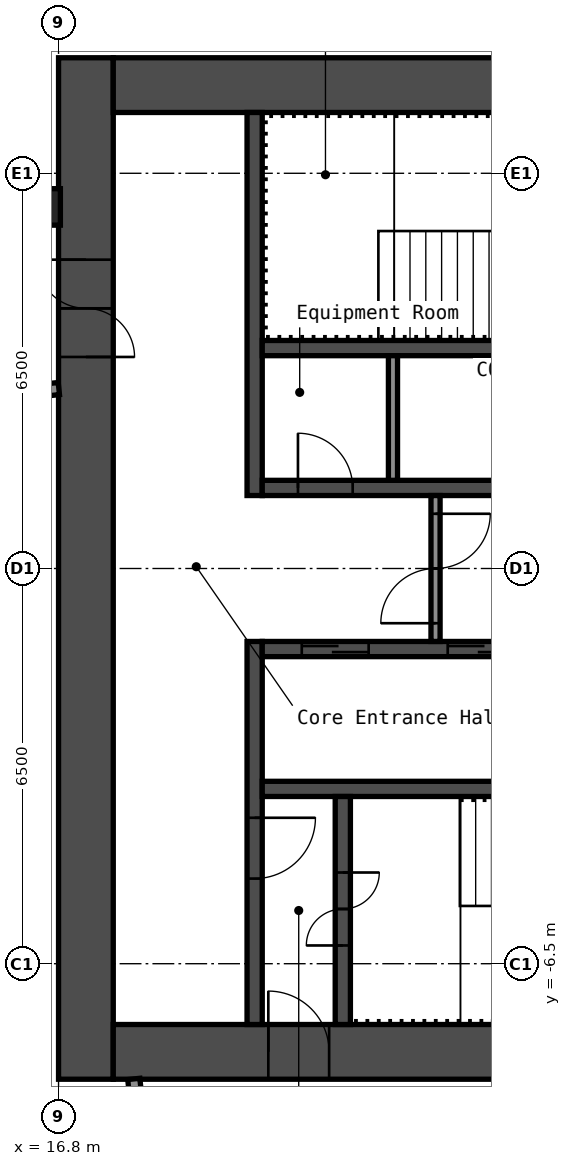
"""IFC4 building model, lengths in metres.
Left out: names, types, materials, properties, quantities, classifications, styles, units other than length and angle.
Written with IfcOpenShell. Run it as: python <this file> out.ifc"""

import sys

from ifc_helpers import new_model, si_unit, direction, frame, frame_2d, origin, origin_2d, place, context, subcontext, project, spatial, rectangle, hollow_rectangle, extrude, element, fill, save


model = new_model("IFC4")
c1 = context("Model", 3, precision=1e-05, world=origin(), true_north=direction((0.0, 1.0)))
c2 = subcontext(c1, "Body", "Model", "MODEL_VIEW")
j1 = project(units=[si_unit("LENGTHUNIT", "METRE"), si_unit("PLANEANGLEUNIT", "RADIAN")], contexts=[c1])
p1 = place(None, origin())
s1 = spatial("IfcSite", under=j1, at=p1, CompositionType="ELEMENT")
p2 = place(p1, origin())
s2 = spatial("IfcBuilding", under=s1, at=p2, CompositionType="ELEMENT")
p3 = place(p2, frame((0.0, 0.0, 248.6)))
s3 = spatial("IfcBuildingStorey", under=s2, at=p3, CompositionType="ELEMENT", Elevation=248.6)
p4 = place(p3, frame((16.53, 5.947, 0.0), z_axis=(0.0, 0.0, 1.0), x_axis=(1.0, 0.0, 0.0)))
e1 = element("IfcColumn", 1, at=p4, inside=s3, PredefinedType="COLUMN", context=c2, shape_type="SweptSolid", body=[
    extrude(hollow_rectangle(XDim=0.6, YDim=0.6, WallThickness=0.025, InnerFilletRadius=0.038, OuterFilletRadius=0.062, at=origin_2d()), origin(), (0.0, 0.0, 1.0), 2.75),
])
p5 = place(p3, frame((17.25, -8.4, 0.0), z_axis=(0.0, 0.0, 1.0), x_axis=(0.0, 1.0, 0.0)))
e2 = element("IfcWall", 2, at=p5, inside=s3, PredefinedType="SHEAR", context=c2, shape_type="SweptSolid", body=[
    extrude(rectangle(XDim=16.8, YDim=0.9, at=frame_2d((8.4, 0.0))), origin(), (0.0, 0.0, 1.0), 2.75),
])
p6 = place(p5, frame((11.879, 0.0, 0.0)))
e3 = element("IfcOpeningElement", 3, at=p6, cuts=e2, PredefinedType="OPENING", context=c2, shape_type="SweptSolid", body=[
    extrude(rectangle(XDim=1.6, YDim=2.1, at=frame_2d((0.8, 1.05))), frame((0.0, 0.46, 0.0), z_axis=(0.0, -1.0, 0.0), x_axis=(1.0, 0.0, 0.0)), (0.0, 0.0, 1.0), 0.92),
])
p7 = place(p3, frame((17.7, 7.95, 0.0), z_axis=(0.0, 0.0, 1.0), x_axis=(1.0, 0.0, 0.0)))
e4 = element("IfcWall", 4, at=p7, inside=s3, PredefinedType="SHEAR", context=c2, shape_type="SweptSolid", body=[
    extrude(rectangle(XDim=15.0, YDim=0.9, at=frame_2d((7.5, 0.0))), origin(), (0.0, 0.0, 1.0), 2.75),
])
p8 = place(p7, frame((10.4, 0.0, 0.0)))
e5 = element("IfcOpeningElement", 5, at=p8, cuts=e4, PredefinedType="OPENING", context=c2, shape_type="SweptSolid", body=[
    extrude(rectangle(XDim=1.2, YDim=2.1, at=frame_2d((0.6, 1.05))), frame((0.0, 0.46, 0.0), z_axis=(0.0, -1.0, 0.0), x_axis=(1.0, 0.0, 0.0)), (0.0, 0.0, 1.0), 0.92),
])
p9 = place(p7, frame((13.35, 0.0, 0.0)))
e6 = element("IfcOpeningElement", 6, at=p9, cuts=e4, PredefinedType="OPENING", context=c2, shape_type="SweptSolid", body=[
    extrude(rectangle(XDim=0.9, YDim=2.1, at=frame_2d((0.45, 1.05))), frame((0.0, 0.46, 0.0), z_axis=(0.0, -1.0, 0.0), x_axis=(1.0, 0.0, 0.0)), (0.0, 0.0, 1.0), 0.92),
])
p10 = place(p3, frame((17.7, -7.95, 0.0), z_axis=(0.0, 0.0, 1.0), x_axis=(1.0, 0.0, 0.0)))
e7 = element("IfcWall", 7, at=p10, inside=s3, PredefinedType="SHEAR", context=c2, shape_type="SweptSolid", body=[
    extrude(rectangle(XDim=15.0, YDim=0.9, at=frame_2d((7.5, 0.0))), origin(), (0.0, 0.0, 1.0), 2.75),
])
p11 = place(p10, frame((2.55, 0.0, 0.0)))
e8 = element("IfcOpeningElement", 8, at=p11, cuts=e7, PredefinedType="OPENING", context=c2, shape_type="SweptSolid", body=[
    extrude(rectangle(XDim=1.0, YDim=2.1, at=frame_2d((0.5, 1.05))), frame((0.0, 0.46, 0.0), z_axis=(0.0, -1.0, 0.0), x_axis=(1.0, 0.0, 0.0)), (0.0, 0.0, 1.0), 0.92),
])
p12 = place(p3, frame((20.025, 1.2, 0.0), z_axis=(0.0, 0.0, 1.0), x_axis=(0.0, 1.0, 0.0)))
e9 = element("IfcWall", 9, at=p12, inside=s3, PredefinedType="SHEAR", context=c2, shape_type="SweptSolid", body=[
    extrude(rectangle(XDim=6.3, YDim=0.25, at=frame_2d((3.15, 0.0))), origin(), (0.0, 0.0, 1.0), 2.75),
])
p13 = place(p3, frame((20.025, -7.5, 0.0), z_axis=(0.0, 0.0, 1.0), x_axis=(0.0, 1.0, 0.0)))
e10 = element("IfcWall", 10, at=p13, inside=s3, PredefinedType="SHEAR", context=c2, shape_type="SweptSolid", body=[
    extrude(rectangle(XDim=6.3, YDim=0.25, at=frame_2d((3.15, 0.0))), origin(), (0.0, 0.0, 1.0), 2.75),
])
p14 = place(p13, frame((2.4, 0.0, 0.0)))
e11 = element("IfcOpeningElement", 11, at=p14, cuts=e10, PredefinedType="OPENING", context=c2, shape_type="SweptSolid", body=[
    extrude(rectangle(XDim=1.0, YDim=2.1, at=frame_2d((0.5, 1.05))), frame((0.0, 0.135, 0.0), z_axis=(0.0, -1.0, 0.0), x_axis=(1.0, 0.0, 0.0)), (0.0, 0.0, 1.0), 0.27),
])
p15 = place(p3, frame((20.15, 1.325, 0.0), z_axis=(0.0, 0.0, 1.0), x_axis=(1.0, 0.0, 0.0)))
e12 = element("IfcWall", 12, at=p15, inside=s3, PredefinedType="SHEAR", context=c2, shape_type="SweptSolid", body=[
    extrude(rectangle(XDim=7.5, YDim=0.25, at=frame_2d((3.75, 0.0))), origin(), (0.0, 0.0, 1.0), 2.75),
])
p16 = place(p15, frame((0.587, 0.0, 0.0)))
e13 = element("IfcOpeningElement", 13, at=p16, cuts=e12, PredefinedType="OPENING", context=c2, shape_type="SweptSolid", body=[
    extrude(rectangle(XDim=0.9, YDim=2.1, at=frame_2d((0.45, 1.05))), frame((0.0, 0.135, 0.0), z_axis=(0.0, -1.0, 0.0), x_axis=(1.0, 0.0, 0.0)), (0.0, 0.0, 1.0), 0.27),
])
p17 = place(p15, frame((4.288, 0.0, 0.0)))
e14 = element("IfcOpeningElement", 14, at=p17, cuts=e12, PredefinedType="OPENING", context=c2, shape_type="SweptSolid", body=[
    extrude(rectangle(XDim=0.9, YDim=2.1, at=frame_2d((0.45, 1.05))), frame((0.0, 0.135, 0.0), z_axis=(0.0, -1.0, 0.0), x_axis=(1.0, 0.0, 0.0)), (0.0, 0.0, 1.0), 0.27),
])
p18 = place(p3, frame((20.15, 3.625, 0.0), z_axis=(0.0, 0.0, 1.0), x_axis=(1.0, 0.0, 0.0)))
e15 = element("IfcWall", 15, at=p18, inside=s3, PredefinedType="SHEAR", context=c2, shape_type="SweptSolid", body=[
    extrude(rectangle(XDim=7.5, YDim=0.25, at=frame_2d((3.75, 0.0))), origin(), (0.0, 0.0, 1.0), 2.75),
])
p19 = place(p3, frame((20.15, -1.325, 0.0), z_axis=(0.0, 0.0, 1.0), x_axis=(1.0, 0.0, 0.0)))
e16 = element("IfcWall", 16, at=p19, inside=s3, PredefinedType="SHEAR", context=c2, shape_type="SweptSolid", body=[
    extrude(rectangle(XDim=7.5, YDim=0.25, at=frame_2d((3.75, 0.0))), origin(), (0.0, 0.0, 1.0), 2.75),
])
p20 = place(p19, frame((0.65, 0.0, 0.0)))
e17 = element("IfcOpeningElement", 17, at=p20, cuts=e16, PredefinedType="OPENING", context=c2, shape_type="SweptSolid", body=[
    extrude(rectangle(XDim=1.1, YDim=2.1, at=frame_2d((0.55, 1.05))), frame((0.0, 0.135, 0.0), z_axis=(0.0, -1.0, 0.0), x_axis=(1.0, 0.0, 0.0)), (0.0, 0.0, 1.0), 0.27),
])
p21 = place(p19, frame((3.05, 0.0, 0.0)))
e18 = element("IfcOpeningElement", 18, at=p21, cuts=e16, PredefinedType="OPENING", context=c2, shape_type="SweptSolid", body=[
    extrude(rectangle(XDim=1.1, YDim=2.1, at=frame_2d((0.55, 1.05))), frame((0.0, 0.135, 0.0), z_axis=(0.0, -1.0, 0.0), x_axis=(1.0, 0.0, 0.0)), (0.0, 0.0, 1.0), 0.27),
])
p22 = place(p19, frame((5.45, 0.0, 0.0)))
e19 = element("IfcOpeningElement", 19, at=p22, cuts=e16, PredefinedType="OPENING", context=c2, shape_type="SweptSolid", body=[
    extrude(rectangle(XDim=1.1, YDim=2.1, at=frame_2d((0.55, 1.05))), frame((0.0, 0.135, 0.0), z_axis=(0.0, -1.0, 0.0), x_axis=(1.0, 0.0, 0.0)), (0.0, 0.0, 1.0), 0.27),
])
p23 = place(p3, frame((20.15, -3.625, 0.0), z_axis=(0.0, 0.0, 1.0), x_axis=(1.0, 0.0, 0.0)))
e20 = element("IfcWall", 20, at=p23, inside=s3, PredefinedType="SHEAR", context=c2, shape_type="SweptSolid", body=[
    extrude(rectangle(XDim=7.5, YDim=0.25, at=frame_2d((3.75, 0.0))), origin(), (0.0, 0.0, 1.0), 2.75),
])
p24 = place(p3, frame((21.475, -7.5, 0.0), z_axis=(0.0, 0.0, 1.0), x_axis=(0.0, 1.0, 0.0)))
e21 = element("IfcWall", 21, at=p24, inside=s3, PredefinedType="SHEAR", context=c2, shape_type="SweptSolid", body=[
    extrude(rectangle(XDim=3.75, YDim=0.25, at=frame_2d((1.875, 0.0))), origin(), (0.0, 0.0, 1.0), 2.75),
])
p25 = place(p24, frame((1.3, 0.0, 0.0)))
e22 = element("IfcOpeningElement", 22, at=p25, cuts=e21, PredefinedType="OPENING", context=c2, shape_type="SweptSolid", body=[
    extrude(rectangle(XDim=1.2, YDim=2.1, at=frame_2d((0.6, 1.05))), frame((0.0, 0.135, 0.0), z_axis=(0.0, -1.0, 0.0), x_axis=(1.0, 0.0, 0.0)), (0.0, 0.0, 1.0), 0.27),
])
p26 = place(p3, frame((23.0, -1.2, 0.0), z_axis=(0.0, 0.0, 1.0), x_axis=(0.0, 1.0, 0.0)))
e23 = element("IfcWall", 23, at=p26, inside=s3, PredefinedType="PARTITIONING", context=c2, shape_type="SweptSolid", body=[
    extrude(rectangle(XDim=2.4, YDim=0.15, at=frame_2d((1.2, 0.0))), origin(), (0.0, 0.0, 1.0), 2.75),
])
p27 = place(p26, frame((0.3, 0.0, 0.0)))
e24 = element("IfcOpeningElement", 24, at=p27, cuts=e23, PredefinedType="OPENING", context=c2, shape_type="SweptSolid", body=[
    extrude(rectangle(XDim=1.8, YDim=2.1, at=frame_2d((0.9, 1.05))), frame((0.0, 0.085, 0.0), z_axis=(0.0, -1.0, 0.0), x_axis=(1.0, 0.0, 0.0)), (0.0, 0.0, 1.0), 0.17),
])
p28 = place(p3, frame((22.3, 1.45, 0.0), z_axis=(0.0, 0.0, 1.0), x_axis=(0.0, 1.0, 0.0)))
e25 = element("IfcWall", 25, at=p28, inside=s3, PredefinedType="PARTITIONING", context=c2, shape_type="SweptSolid", body=[
    extrude(rectangle(XDim=2.05, YDim=0.15, at=frame_2d((1.025, 0.0))), origin(), (0.0, 0.0, 1.0), 2.75),
])
p29 = place(p3, frame((-16.572, -0.549, 0.0), z_axis=(0.0, 0.0, 1.0), x_axis=(0.994521146831, 0.104535584879, 0.0)))
e26 = element("IfcWall", 26, at=p29, inside=s3, PredefinedType="PARTITIONING", context=c2, shape_type="SweptSolid", body=[
    extrude(rectangle(XDim=33.561, YDim=0.2, at=frame_2d((16.78, 0.0))), origin(), (0.0, 0.0, 1.0), 2.75),
])
p30 = place(p29, frame((4.2, 0.0, 0.0)))
e27 = element("IfcOpeningElement", 27, at=p30, cuts=e26, PredefinedType="OPENING", context=c2, shape_type="SweptSolid", body=[
    extrude(rectangle(XDim=1.6, YDim=2.1, at=frame_2d((0.8, 1.05))), frame((0.0, 0.11, 0.0), z_axis=(0.0, -1.0, 0.0), x_axis=(1.0, 0.0, 0.0)), (0.0, 0.0, 1.0), 0.22),
])
p31 = place(p29, frame((10.64, 0.0, 0.0)))
e28 = element("IfcOpeningElement", 28, at=p31, cuts=e26, PredefinedType="OPENING", context=c2, shape_type="SweptSolid", body=[
    extrude(rectangle(XDim=0.9, YDim=2.1, at=frame_2d((0.45, 1.05))), frame((0.0, 0.11, 0.0), z_axis=(0.0, -1.0, 0.0), x_axis=(1.0, 0.0, 0.0)), (0.0, 0.0, 1.0), 0.22),
])
p32 = place(p29, frame((14.84, 0.0, 0.0)))
e29 = element("IfcOpeningElement", 29, at=p32, cuts=e26, PredefinedType="OPENING", context=c2, shape_type="SweptSolid", body=[
    extrude(rectangle(XDim=0.9, YDim=2.1, at=frame_2d((0.45, 1.05))), frame((0.0, 0.11, 0.0), z_axis=(0.0, -1.0, 0.0), x_axis=(1.0, 0.0, 0.0)), (0.0, 0.0, 1.0), 0.22),
])
p33 = place(p29, frame((19.65, 0.0, 0.0)))
e30 = element("IfcOpeningElement", 30, at=p33, cuts=e26, PredefinedType="OPENING", context=c2, shape_type="SweptSolid", body=[
    extrude(rectangle(XDim=1.0, YDim=2.1, at=frame_2d((0.5, 1.05))), frame((0.0, 0.11, 0.0), z_axis=(0.0, -1.0, 0.0), x_axis=(1.0, 0.0, 0.0)), (0.0, 0.0, 1.0), 0.22),
])
p34 = place(p29, frame((21.35, 0.0, 0.0)))
e31 = element("IfcOpeningElement", 31, at=p34, cuts=e26, PredefinedType="OPENING", context=c2, shape_type="SweptSolid", body=[
    extrude(rectangle(XDim=1.0, YDim=2.1, at=frame_2d((0.5, 1.05))), frame((0.0, 0.11, 0.0), z_axis=(0.0, -1.0, 0.0), x_axis=(1.0, 0.0, 0.0)), (0.0, 0.0, 1.0), 0.22),
])
p35 = place(p29, frame((29.4, 0.0, 0.0)))
e32 = element("IfcOpeningElement", 32, at=p35, cuts=e26, PredefinedType="OPENING", context=c2, shape_type="SweptSolid", body=[
    extrude(rectangle(XDim=1.6, YDim=2.1, at=frame_2d((0.8, 1.05))), frame((0.0, 0.11, 0.0), z_axis=(0.0, -1.0, 0.0), x_axis=(1.0, 0.0, 0.0)), (0.0, 0.0, 1.0), 0.22),
])
p36 = place(p3, frame((18.516, -12.949, 0.0), z_axis=(0.0, 0.0, 1.0), x_axis=(-0.104548796268, 0.994519758074, 0.0)))
e33 = element("IfcWall", 33, at=p36, inside=s3, PredefinedType="PARTITIONING", context=c2, shape_type="SweptSolid", body=[
    extrude(rectangle(XDim=4.579, YDim=0.2, at=frame_2d((2.29, 0.0))), origin(), (0.0, 0.0, 1.0), 2.75),
])
p37 = place(p6, origin())
e34 = element("IfcDoor", 34, at=p37, inside=s3, OperationType="DOUBLE_DOOR_SINGLE_SWING", PredefinedType="DOOR", context=c2, shape_type="SweptSolid", body=[
    extrude(rectangle(XDim=1.6, YDim=2.1, at=frame_2d((0.8, 1.05))), frame((0.0, 0.025, 0.0), z_axis=(0.0, -1.0, 0.0), x_axis=(1.0, 0.0, 0.0)), (0.0, 0.0, 1.0), 0.05),
])
fill(e3, e34)
p38 = place(p11, origin())
e35 = element("IfcDoor", 35, at=p38, inside=s3, OperationType="SINGLE_SWING_RIGHT", PredefinedType="DOOR", context=c2, shape_type="SweptSolid", body=[
    extrude(rectangle(XDim=1.0, YDim=2.1, at=frame_2d((0.5, 1.05))), frame((0.0, 0.025, 0.0), z_axis=(0.0, -1.0, 0.0), x_axis=(1.0, 0.0, 0.0)), (0.0, 0.0, 1.0), 0.05),
])
fill(e8, e35)
p39 = place(p25, origin())
e36 = element("IfcDoor", 36, at=p39, inside=s3, OperationType="DOUBLE_DOOR_SINGLE_SWING", PredefinedType="DOOR", context=c2, shape_type="SweptSolid", body=[
    extrude(rectangle(XDim=1.2, YDim=2.1, at=frame_2d((0.6, 1.05))), frame((0.0, 0.025, 0.0), z_axis=(0.0, -1.0, 0.0), x_axis=(1.0, 0.0, 0.0)), (0.0, 0.0, 1.0), 0.05),
])
fill(e22, e36)
p40 = place(p14, origin())
e37 = element("IfcDoor", 37, at=p40, inside=s3, OperationType="SINGLE_SWING_RIGHT", PredefinedType="DOOR", context=c2, shape_type="SweptSolid", body=[
    extrude(rectangle(XDim=1.0, YDim=2.1, at=frame_2d((0.5, 1.05))), frame((0.0, 0.025, 0.0), z_axis=(0.0, -1.0, 0.0), x_axis=(1.0, 0.0, 0.0)), (0.0, 0.0, 1.0), 0.05),
])
fill(e11, e37)
p41 = place(p27, origin())
e38 = element("IfcDoor", 38, at=p41, inside=s3, OperationType="DOUBLE_DOOR_SINGLE_SWING", PredefinedType="DOOR", context=c2, shape_type="SweptSolid", body=[
    extrude(rectangle(XDim=1.8, YDim=2.1, at=frame_2d((0.9, 1.05))), frame((0.0, 0.025, 0.0), z_axis=(0.0, -1.0, 0.0), x_axis=(1.0, 0.0, 0.0)), (0.0, 0.0, 1.0), 0.05),
])
fill(e24, e38)
p42 = place(p16, origin())
e39 = element("IfcDoor", 39, at=p42, inside=s3, OperationType="SINGLE_SWING_RIGHT", PredefinedType="DOOR", context=c2, shape_type="SweptSolid", body=[
    extrude(rectangle(XDim=0.9, YDim=2.1, at=frame_2d((0.45, 1.05))), frame((0.0, 0.025, 0.0), z_axis=(0.0, -1.0, 0.0), x_axis=(1.0, 0.0, 0.0)), (0.0, 0.0, 1.0), 0.05),
])
fill(e13, e39)
p43 = place(p20, origin())
e40 = element("IfcDoor", 40, at=p43, inside=s3, OperationType="DOUBLE_DOOR_SLIDING", PredefinedType="DOOR", context=c2, shape_type="SweptSolid", body=[
    extrude(rectangle(XDim=1.1, YDim=2.1, at=frame_2d((0.55, 1.05))), frame((0.0, 0.025, 0.0), z_axis=(0.0, -1.0, 0.0), x_axis=(1.0, 0.0, 0.0)), (0.0, 0.0, 1.0), 0.05),
])
fill(e17, e40)
p44 = place(p21, origin())
e41 = element("IfcDoor", 41, at=p44, inside=s3, OperationType="DOUBLE_DOOR_SLIDING", PredefinedType="DOOR", context=c2, shape_type="SweptSolid", body=[
    extrude(rectangle(XDim=1.1, YDim=2.1, at=frame_2d((0.55, 1.05))), frame((0.0, 0.025, 0.0), z_axis=(0.0, -1.0, 0.0), x_axis=(1.0, 0.0, 0.0)), (0.0, 0.0, 1.0), 0.05),
])
fill(e18, e41)
save(model, sys.argv[1])
